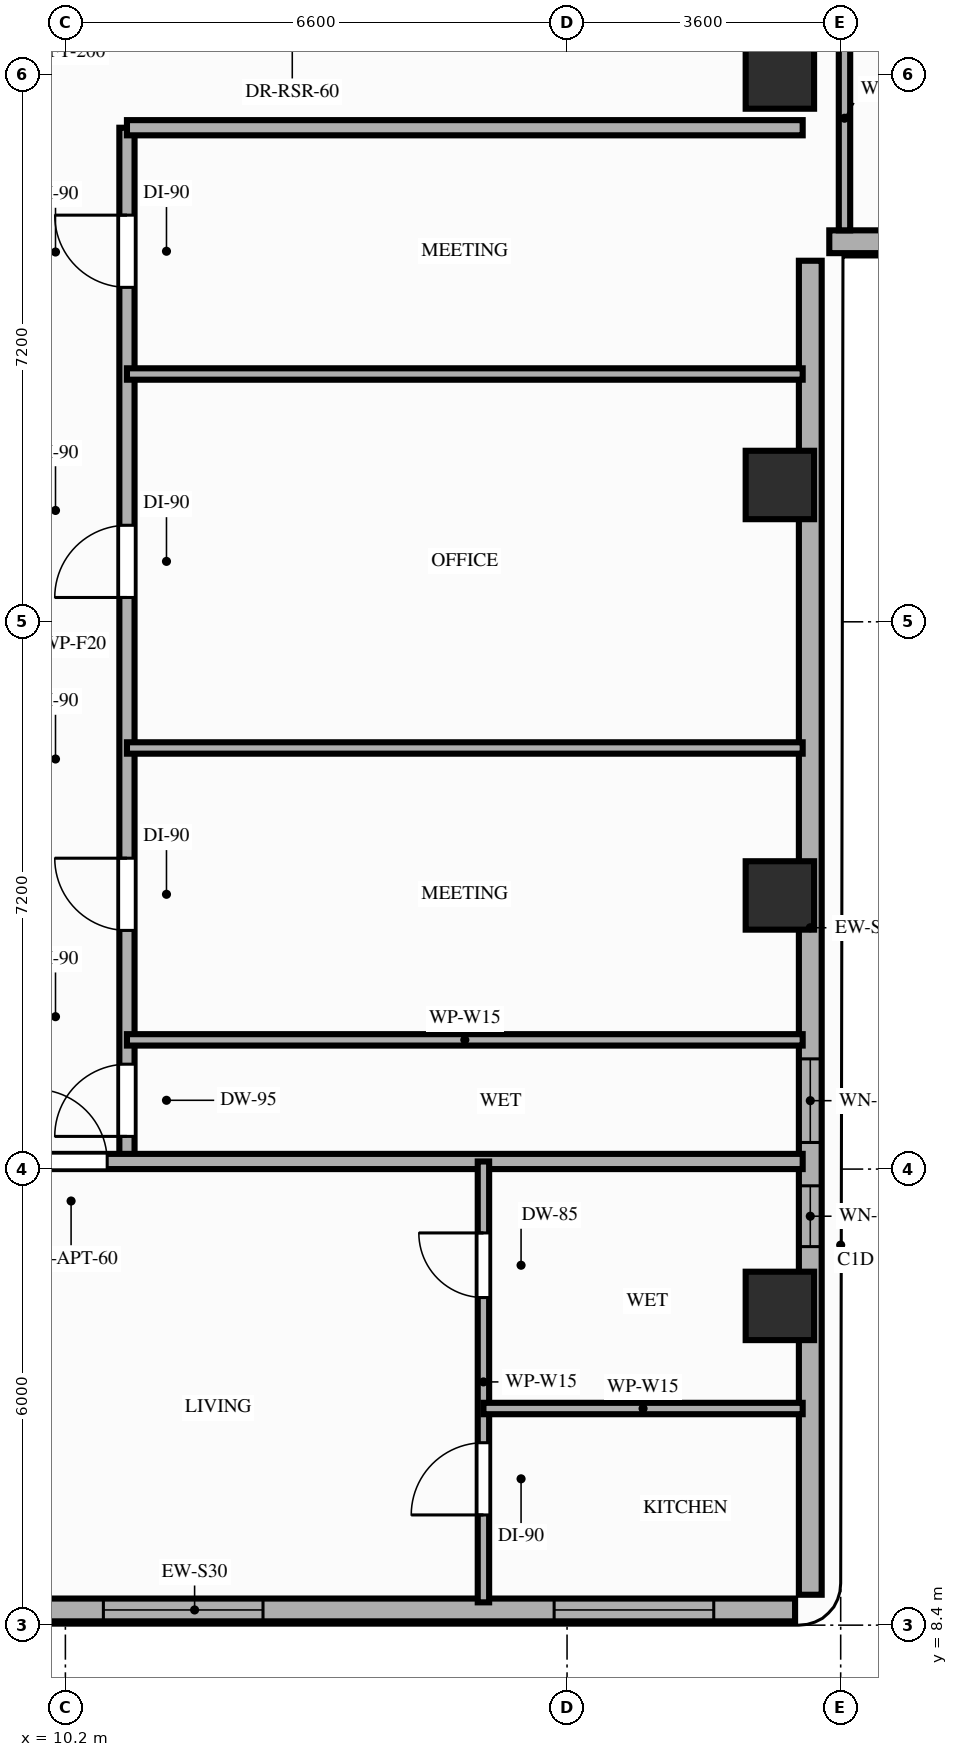
"""IFC4 building model, lengths in metres.
Left out: names, types, materials, properties, quantities, classifications, styles, units other than length and angle.
Written with IfcOpenShell. Run it as: python <this file> out.ifc"""

import sys

from ifc_helpers import new_model, si_unit, direction, frame, frame_2d, origin, origin_2d, place, context, subcontext, project, spatial, rectangle, extrude, element, fill, save


model = new_model("IFC4")
c1 = context("Model", 3, precision=1e-05, world=origin(), true_north=direction((0.0, 1.0)))
c2 = subcontext(c1, "Body", "Model", "MODEL_VIEW")
j1 = project(units=[si_unit("LENGTHUNIT", "METRE"), si_unit("PLANEANGLEUNIT", "RADIAN")], contexts=[c1])
p1 = place(None, origin())
s1 = spatial("IfcSite", under=j1, at=p1, CompositionType="ELEMENT")
p2 = place(p1, origin())
s2 = spatial("IfcBuilding", under=s1, at=p2, CompositionType="ELEMENT")
p3 = place(p2, frame((0.0, 0.0, 169.6)))
s3 = spatial("IfcBuildingStorey", under=s2, at=p3, CompositionType="ELEMENT", Elevation=169.6)
for number, where, z_axis, x_axis in (
    (1, (19.6, 12.6, 0.0), (0.0, 0.0, 1.0), (1.0, 0.0, 0.0)),
    (2, (19.6, 18.0, 0.0), (0.0, 0.0, 1.0), (1.0, 0.0, 0.0)),
    (3, (19.6, 23.4, 0.0), (0.0, 0.0, 1.0), (1.0, 0.0, 0.0)),
    (4, (19.6, 28.8, 0.0), (0.0, 0.0, 1.0), (1.0, 0.0, 0.0)),
):
    element("IfcColumn", number, at=place(p3, frame(where, z_axis=z_axis, x_axis=x_axis)), inside=s3, PredefinedType="COLUMN", context=c2, shape_type="SweptSolid", body=[
        extrude(rectangle(XDim=0.9, YDim=0.9, at=origin_2d()), origin(), (0.0, 0.0, 1.0), 3.2),
    ])
p4 = place(p3, frame((4.0, 8.6, 0.0), z_axis=(0.0, 0.0, 1.0), x_axis=(1.0, 0.0, 0.0)))
e5 = element("IfcWall", 5, at=p4, inside=s3, PredefinedType="STANDARD", context=c2, shape_type="SweptSolid", body=[
    extrude(rectangle(XDim=15.8, YDim=0.3, at=frame_2d((7.9, 0.0))), origin(), (0.0, 0.0, 1.0), 3.02),
])
p5 = place(p4, frame((6.7, 0.0, 0.85)))
e6 = element("IfcOpeningElement", 6, at=p5, cuts=e5, PredefinedType="OPENING", context=c2, shape_type="SweptSolid", body=[
    extrude(rectangle(XDim=2.1, YDim=1.8, at=frame_2d((1.05, 0.9))), frame((0.0, 0.16, 0.0), z_axis=(0.0, -1.0, 0.0), x_axis=(1.0, 0.0, 0.0)), (0.0, 0.0, 1.0), 0.32),
])
p6 = place(p4, frame((12.63, 0.0, 0.85)))
e7 = element("IfcOpeningElement", 7, at=p6, cuts=e5, PredefinedType="OPENING", context=c2, shape_type="SweptSolid", body=[
    extrude(rectangle(XDim=2.1, YDim=1.8, at=frame_2d((1.05, 0.9))), frame((0.0, 0.16, 0.0), z_axis=(0.0, -1.0, 0.0), x_axis=(1.0, 0.0, 0.0)), (0.0, 0.0, 1.0), 0.32),
])
p7 = place(p3, frame((20.0, 8.8, 0.0), z_axis=(0.0, 0.0, 1.0), x_axis=(0.0, 1.0, 0.0)))
e8 = element("IfcWall", 8, at=p7, inside=s3, PredefinedType="STANDARD", context=c2, shape_type="SweptSolid", body=[
    extrude(rectangle(XDim=17.55, YDim=0.3, at=frame_2d((8.775, 0.0))), origin(), (0.0, 0.0, 1.0), 2.45),
])
p8 = place(p7, frame((4.58, 0.0, 0.85)))
e9 = element("IfcOpeningElement", 9, at=p8, cuts=e8, PredefinedType="OPENING", context=c2, shape_type="SweptSolid", body=[
    extrude(rectangle(XDim=0.8, YDim=1.35, at=frame_2d((0.4, 0.675))), frame((0.0, 0.16, 0.0), z_axis=(0.0, -1.0, 0.0), x_axis=(1.0, 0.0, 0.0)), (0.0, 0.0, 1.0), 0.32),
])
p9 = place(p7, frame((5.95, 0.0, 0.85)))
e10 = element("IfcOpeningElement", 10, at=p9, cuts=e8, PredefinedType="OPENING", context=c2, shape_type="SweptSolid", body=[
    extrude(rectangle(XDim=1.1, YDim=1.35, at=frame_2d((0.55, 0.675))), frame((0.0, 0.16, 0.0), z_axis=(0.0, -1.0, 0.0), x_axis=(1.0, 0.0, 0.0)), (0.0, 0.0, 1.0), 0.32),
])
p10 = place(p3, frame((20.25, 26.6, 0.0), z_axis=(0.0, 0.0, 1.0), x_axis=(1.0, 0.0, 0.0)))
e11 = element("IfcWall", 11, at=p10, inside=s3, PredefinedType="STANDARD", context=c2, shape_type="SweptSolid", body=[
    extrude(rectangle(XDim=21.35, YDim=0.3, at=frame_2d((10.675, 0.0))), origin(), (0.0, 0.0, 1.0), 2.71),
])
p11 = place(p10, frame((13.9, 0.0, 0.0)))
e12 = element("IfcOpeningElement", 12, at=p11, cuts=e11, PredefinedType="OPENING", context=c2, shape_type="SweptSolid", body=[
    extrude(rectangle(XDim=1.3, YDim=2.08, at=frame_2d((0.65, 1.04))), frame((0.0, 0.16, 0.0), z_axis=(0.0, -1.0, 0.0), x_axis=(1.0, 0.0, 0.0)), (0.0, 0.0, 1.0), 0.32),
])
p12 = place(p10, frame((17.73, 0.0, 0.85)))
e13 = element("IfcOpeningElement", 13, at=p12, cuts=e11, PredefinedType="OPENING", context=c2, shape_type="SweptSolid", body=[
    extrude(rectangle(XDim=2.1, YDim=1.61, at=frame_2d((1.05, 0.805))), frame((0.0, 0.16, 0.0), z_axis=(0.0, -1.0, 0.0), x_axis=(1.0, 0.0, 0.0)), (0.0, 0.0, 1.0), 0.32),
])
p13 = place(p10, frame((2.1, 0.0, 0.85)))
e14 = element("IfcOpeningElement", 14, at=p13, cuts=e11, PredefinedType="OPENING", context=c2, shape_type="SweptSolid", body=[
    extrude(rectangle(XDim=2.1, YDim=1.61, at=frame_2d((1.05, 0.805))), frame((0.0, 0.16, 0.0), z_axis=(0.0, -1.0, 0.0), x_axis=(1.0, 0.0, 0.0)), (0.0, 0.0, 1.0), 0.32),
])
p14 = place(p10, frame((7.6, 0.0, 0.85)))
e15 = element("IfcOpeningElement", 15, at=p14, cuts=e11, PredefinedType="OPENING", context=c2, shape_type="SweptSolid", body=[
    extrude(rectangle(XDim=2.1, YDim=1.61, at=frame_2d((1.05, 0.805))), frame((0.0, 0.16, 0.0), z_axis=(0.0, -1.0, 0.0), x_axis=(1.0, 0.0, 0.0)), (0.0, 0.0, 1.0), 0.32),
])
p15 = place(p3, frame((11.01, 14.5, 0.0), z_axis=(0.0, 0.0, 1.0), x_axis=(0.0, 1.0, 0.0)))
e16 = element("IfcWall", 16, at=p15, inside=s3, PredefinedType="PARTITIONING", context=c2, shape_type="SweptSolid", body=[
    extrude(rectangle(XDim=13.6, YDim=0.2, at=frame_2d((6.8, 0.0))), origin(), (0.0, 0.0, 1.0), 2.45),
])
p16 = place(p15, frame((0.33, 0.0, 0.0)))
e17 = element("IfcOpeningElement", 17, at=p16, cuts=e16, PredefinedType="OPENING", context=c2, shape_type="SweptSolid", body=[
    extrude(rectangle(XDim=0.95, YDim=2.1, at=frame_2d((0.475, 1.05))), frame((0.0, 0.11, 0.0), z_axis=(0.0, -1.0, 0.0), x_axis=(1.0, 0.0, 0.0)), (0.0, 0.0, 1.0), 0.22),
])
p17 = place(p15, frame((3.04, 0.0, 0.0)))
e18 = element("IfcOpeningElement", 18, at=p17, cuts=e16, PredefinedType="OPENING", context=c2, shape_type="SweptSolid", body=[
    extrude(rectangle(XDim=0.95, YDim=2.15, at=frame_2d((0.475, 1.075))), frame((0.0, 0.11, 0.0), z_axis=(0.0, -1.0, 0.0), x_axis=(1.0, 0.0, 0.0)), (0.0, 0.0, 1.0), 0.22),
])
p18 = place(p15, frame((7.42, 0.0, 0.0)))
e19 = element("IfcOpeningElement", 19, at=p18, cuts=e16, PredefinedType="OPENING", context=c2, shape_type="SweptSolid", body=[
    extrude(rectangle(XDim=0.95, YDim=2.15, at=frame_2d((0.475, 1.075))), frame((0.0, 0.11, 0.0), z_axis=(0.0, -1.0, 0.0), x_axis=(1.0, 0.0, 0.0)), (0.0, 0.0, 1.0), 0.22),
])
p19 = place(p15, frame((11.5, 0.0, 0.0)))
e20 = element("IfcOpeningElement", 20, at=p19, cuts=e16, PredefinedType="OPENING", context=c2, shape_type="SweptSolid", body=[
    extrude(rectangle(XDim=0.95, YDim=2.15, at=frame_2d((0.475, 1.075))), frame((0.0, 0.11, 0.0), z_axis=(0.0, -1.0, 0.0), x_axis=(1.0, 0.0, 0.0)), (0.0, 0.0, 1.0), 0.22),
])
p20 = place(p3, frame((3.9, 14.5, 0.0), z_axis=(0.0, 0.0, 1.0), x_axis=(1.0, 0.0, 0.0)))
e21 = element("IfcWall", 21, at=p20, inside=s3, PredefinedType="PARTITIONING", context=c2, shape_type="SweptSolid", body=[
    extrude(rectangle(XDim=16.0, YDim=0.2, at=frame_2d((8.0, 0.0))), origin(), (0.0, 0.0, 1.0), 2.45),
])
p21 = place(p20, frame((5.9, 0.0, 0.0)))
e22 = element("IfcOpeningElement", 22, at=p21, cuts=e21, PredefinedType="OPENING", context=c2, shape_type="SweptSolid", body=[
    extrude(rectangle(XDim=0.95, YDim=2.15, at=frame_2d((0.475, 1.075))), frame((0.0, 0.11, 0.0), z_axis=(0.0, -1.0, 0.0), x_axis=(1.0, 0.0, 0.0)), (0.0, 0.0, 1.0), 0.22),
])
p22 = place(p3, frame((11.01, 28.1, 0.0), z_axis=(0.0, 0.0, 1.0), x_axis=(1.0, 0.0, 0.0)))
e23 = element("IfcWall", 23, at=p22, inside=s3, PredefinedType="PARTITIONING", context=c2, shape_type="SweptSolid", body=[
    extrude(rectangle(XDim=8.89, YDim=0.2, at=frame_2d((4.445, 0.0))), origin(), (0.0, 0.0, 1.0), 2.45),
])
p23 = place(p3, frame((20.45, 26.75, 0.0), z_axis=(0.0, 0.0, 1.0), x_axis=(0.0, 1.0, 0.0)))
e24 = element("IfcWall", 24, at=p23, inside=s3, PredefinedType="PARTITIONING", context=c2, shape_type="SweptSolid", body=[
    extrude(rectangle(XDim=2.95, YDim=0.15, at=frame_2d((1.475, 0.0))), origin(), (0.0, 0.0, 1.0), 2.45),
])
p24 = place(p3, frame((15.7, 8.7, 0.0), z_axis=(0.0, 0.0, 1.0), x_axis=(0.0, 1.0, 0.0)))
e25 = element("IfcWall", 25, at=p24, inside=s3, PredefinedType="PARTITIONING", context=c2, shape_type="SweptSolid", body=[
    extrude(rectangle(XDim=5.8, YDim=0.15, at=frame_2d((2.9, 0.0))), origin(), (0.0, 0.0, 1.0), 2.45),
])
p25 = place(p24, frame((1.15, 0.0, 0.0)))
e26 = element("IfcOpeningElement", 26, at=p25, cuts=e25, PredefinedType="OPENING", context=c2, shape_type="SweptSolid", body=[
    extrude(rectangle(XDim=0.95, YDim=2.15, at=frame_2d((0.475, 1.075))), frame((0.0, 0.085, 0.0), z_axis=(0.0, -1.0, 0.0), x_axis=(1.0, 0.0, 0.0)), (0.0, 0.0, 1.0), 0.17),
])
p26 = place(p24, frame((4.01, 0.0, 0.0)))
e27 = element("IfcOpeningElement", 27, at=p26, cuts=e25, PredefinedType="OPENING", context=c2, shape_type="SweptSolid", body=[
    extrude(rectangle(XDim=0.85, YDim=2.1, at=frame_2d((0.425, 1.05))), frame((0.0, 0.085, 0.0), z_axis=(0.0, -1.0, 0.0), x_axis=(1.0, 0.0, 0.0)), (0.0, 0.0, 1.0), 0.17),
])
p27 = place(p3, frame((15.7, 11.25, 0.0), z_axis=(0.0, 0.0, 1.0), x_axis=(1.0, 0.0, 0.0)))
e28 = element("IfcWall", 28, at=p27, inside=s3, PredefinedType="PARTITIONING", context=c2, shape_type="SweptSolid", body=[
    extrude(rectangle(XDim=4.2, YDim=0.15, at=frame_2d((2.1, 0.0))), origin(), (0.0, 0.0, 1.0), 3.02),
])
for number, where, z_axis, x_axis in (
    (29, (11.01, 16.1, 0.0), (0.0, 0.0, 1.0), (1.0, 0.0, 0.0)),
    (30, (11.01, 19.94, 0.0), (0.0, 0.0, 1.0), (1.0, 0.0, 0.0)),
    (31, (11.01, 24.86, 0.0), (0.0, 0.0, 1.0), (1.0, 0.0, 0.0)),
):
    element("IfcWall", number, at=place(p3, frame(where, z_axis=z_axis, x_axis=x_axis)), inside=s3, PredefinedType="PARTITIONING", context=c2, shape_type="SweptSolid", body=[
        extrude(rectangle(XDim=8.89, YDim=0.15, at=frame_2d((4.445, 0.0))), origin(), (0.0, 0.0, 1.0), 2.45),
    ])
p28 = place(p5, origin())
e32 = element("IfcWindow", 32, at=p28, inside=s3, PartitioningType="SINGLE_PANEL", PredefinedType="WINDOW", context=c2, shape_type="SweptSolid", body=[
    extrude(rectangle(XDim=2.1, YDim=1.8, at=frame_2d((1.05, 0.9))), frame((0.0, 0.03, 0.0), z_axis=(0.0, -1.0, 0.0), x_axis=(1.0, 0.0, 0.0)), (0.0, 0.0, 1.0), 0.06),
])
fill(e6, e32)
p29 = place(p6, origin())
e33 = element("IfcWindow", 33, at=p29, inside=s3, PartitioningType="SINGLE_PANEL", PredefinedType="WINDOW", context=c2, shape_type="SweptSolid", body=[
    extrude(rectangle(XDim=2.1, YDim=1.8, at=frame_2d((1.05, 0.9))), frame((0.0, 0.03, 0.0), z_axis=(0.0, -1.0, 0.0), x_axis=(1.0, 0.0, 0.0)), (0.0, 0.0, 1.0), 0.06),
])
fill(e7, e33)
p30 = place(p8, origin())
e34 = element("IfcWindow", 34, at=p30, inside=s3, PartitioningType="SINGLE_PANEL", PredefinedType="WINDOW", context=c2, shape_type="SweptSolid", body=[
    extrude(rectangle(XDim=0.8, YDim=1.35, at=frame_2d((0.4, 0.675))), frame((0.0, 0.03, 0.0), z_axis=(0.0, -1.0, 0.0), x_axis=(1.0, 0.0, 0.0)), (0.0, 0.0, 1.0), 0.06),
])
fill(e9, e34)
p31 = place(p9, origin())
e35 = element("IfcWindow", 35, at=p31, inside=s3, PartitioningType="SINGLE_PANEL", PredefinedType="WINDOW", context=c2, shape_type="SweptSolid", body=[
    extrude(rectangle(XDim=1.1, YDim=1.35, at=frame_2d((0.55, 0.675))), frame((0.0, 0.03, 0.0), z_axis=(0.0, -1.0, 0.0), x_axis=(1.0, 0.0, 0.0)), (0.0, 0.0, 1.0), 0.06),
])
fill(e10, e35)
p32 = place(p21, origin())
e36 = element("IfcDoor", 36, at=p32, inside=s3, OperationType="SINGLE_SWING_LEFT", PredefinedType="DOOR", context=c2, shape_type="SweptSolid", body=[
    extrude(rectangle(XDim=0.95, YDim=2.15, at=frame_2d((0.475, 1.075))), frame((0.0, 0.025, 0.0), z_axis=(0.0, -1.0, 0.0), x_axis=(1.0, 0.0, 0.0)), (0.0, 0.0, 1.0), 0.05),
])
fill(e22, e36)
p33 = place(p25, origin())
e37 = element("IfcDoor", 37, at=p33, inside=s3, OperationType="SINGLE_SWING_LEFT", PredefinedType="DOOR", context=c2, shape_type="SweptSolid", body=[
    extrude(rectangle(XDim=0.95, YDim=2.15, at=frame_2d((0.475, 1.075))), frame((0.0, 0.025, 0.0), z_axis=(0.0, -1.0, 0.0), x_axis=(1.0, 0.0, 0.0)), (0.0, 0.0, 1.0), 0.05),
])
fill(e26, e37)
p34 = place(p26, origin())
e38 = element("IfcDoor", 38, at=p34, inside=s3, OperationType="SINGLE_SWING_RIGHT", PredefinedType="DOOR", context=c2, shape_type="SweptSolid", body=[
    extrude(rectangle(XDim=0.85, YDim=2.1, at=frame_2d((0.425, 1.05))), frame((0.0, 0.025, 0.0), z_axis=(0.0, -1.0, 0.0), x_axis=(1.0, 0.0, 0.0)), (0.0, 0.0, 1.0), 0.05),
])
fill(e27, e38)
p35 = place(p16, origin())
e39 = element("IfcDoor", 39, at=p35, inside=s3, OperationType="SINGLE_SWING_LEFT", PredefinedType="DOOR", context=c2, shape_type="SweptSolid", body=[
    extrude(rectangle(XDim=0.95, YDim=2.1, at=frame_2d((0.475, 1.05))), frame((0.0, 0.025, 0.0), z_axis=(0.0, -1.0, 0.0), x_axis=(1.0, 0.0, 0.0)), (0.0, 0.0, 1.0), 0.05),
])
fill(e17, e39)
p36 = place(p17, origin())
e40 = element("IfcDoor", 40, at=p36, inside=s3, OperationType="SINGLE_SWING_RIGHT", PredefinedType="DOOR", context=c2, shape_type="SweptSolid", body=[
    extrude(rectangle(XDim=0.95, YDim=2.15, at=frame_2d((0.475, 1.075))), frame((0.0, 0.025, 0.0), z_axis=(0.0, -1.0, 0.0), x_axis=(1.0, 0.0, 0.0)), (0.0, 0.0, 1.0), 0.05),
])
fill(e18, e40)
p37 = place(p18, origin())
e41 = element("IfcDoor", 41, at=p37, inside=s3, OperationType="SINGLE_SWING_LEFT", PredefinedType="DOOR", context=c2, shape_type="SweptSolid", body=[
    extrude(rectangle(XDim=0.95, YDim=2.15, at=frame_2d((0.475, 1.075))), frame((0.0, 0.025, 0.0), z_axis=(0.0, -1.0, 0.0), x_axis=(1.0, 0.0, 0.0)), (0.0, 0.0, 1.0), 0.05),
])
fill(e19, e41)
p38 = place(p19, origin())
e42 = element("IfcDoor", 42, at=p38, inside=s3, OperationType="SINGLE_SWING_RIGHT", PredefinedType="DOOR", context=c2, shape_type="SweptSolid", body=[
    extrude(rectangle(XDim=0.95, YDim=2.15, at=frame_2d((0.475, 1.075))), frame((0.0, 0.025, 0.0), z_axis=(0.0, -1.0, 0.0), x_axis=(1.0, 0.0, 0.0)), (0.0, 0.0, 1.0), 0.05),
])
fill(e20, e42)
save(model, sys.argv[1])
